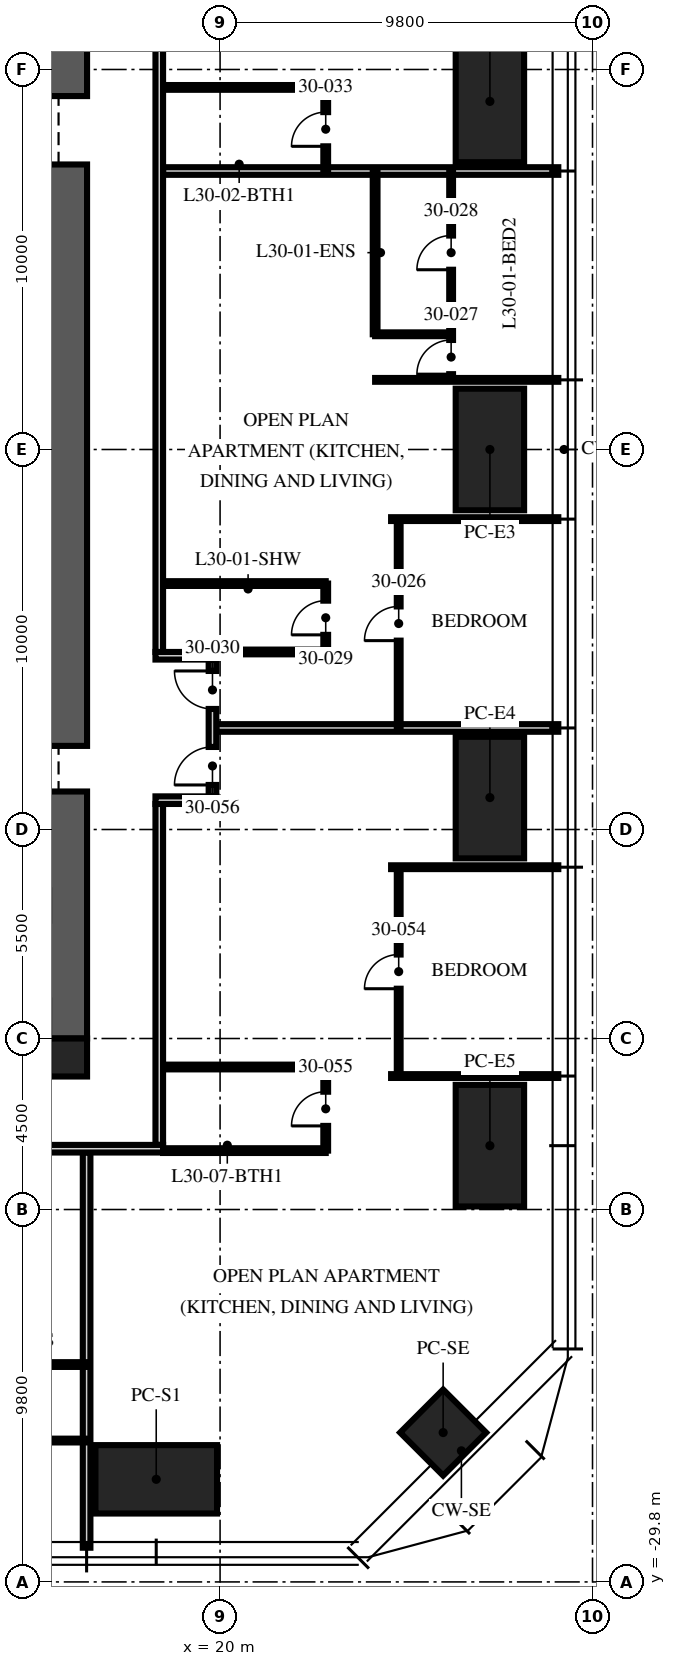
"""IFC4 building model, lengths in metres.
Left out: names, types, materials, properties, quantities, classifications, styles, units other than length and angle.
Written with IfcOpenShell. Run it as: python <this file> out.ifc"""

import sys

from ifc_helpers import new_model, si_unit, direction, frame, frame_2d, origin, origin_2d, place, context, subcontext, project, spatial, rectangle, extrude, element, fill, save


model = new_model("IFC4")
c1 = context("Model", 3, precision=1e-05, world=origin(), true_north=direction((0.0, 1.0)))
c2 = subcontext(c1, "Body", "Model", "MODEL_VIEW")
j1 = project(units=[si_unit("LENGTHUNIT", "METRE"), si_unit("PLANEANGLEUNIT", "RADIAN")], contexts=[c1])
p1 = place(None, origin())
s1 = spatial("IfcSite", under=j1, at=p1, CompositionType="ELEMENT")
p2 = place(p1, origin())
s2 = spatial("IfcBuilding", under=s1, at=p2, CompositionType="ELEMENT")
p3 = place(p2, frame((0.0, 0.0, 122.25)))
s3 = spatial("IfcBuildingStorey", under=s2, at=p3, CompositionType="ELEMENT", Elevation=122.25)
p4 = place(p3, frame((15.5, -15.5, -0.25), z_axis=(0.0, 0.0, 1.0), x_axis=(0.0, 1.0, 0.0)))
e1 = element("IfcWall", 1, at=p4, inside=s3, PredefinedType="SHEAR", context=c2, shape_type="SweptSolid", body=[
    extrude(rectangle(XDim=31.0, YDim=2.0, at=frame_2d((15.5, 0.0))), origin(), (0.0, 0.0, 1.0), 3.75),
])
p5 = place(p4, frame((6.5, 0.0, 0.25)))
e2 = element("IfcOpeningElement", 2, at=p5, cuts=e1, PredefinedType="OPENING", context=c2, shape_type="SweptSolid", body=[
    extrude(rectangle(XDim=1.2, YDim=2.1, at=frame_2d((0.6, 1.05))), frame((0.0, 1.01, 0.0), z_axis=(0.0, -1.0, 0.0), x_axis=(1.0, 0.0, 0.0)), (0.0, 0.0, 1.0), 2.02),
])
p6 = place(p4, frame((23.0, 0.0, 0.25)))
e3 = element("IfcOpeningElement", 3, at=p6, cuts=e1, PredefinedType="OPENING", context=c2, shape_type="SweptSolid", body=[
    extrude(rectangle(XDim=1.8, YDim=2.1, at=frame_2d((0.9, 1.05))), frame((0.0, 1.01, 0.0), z_axis=(0.0, -1.0, 0.0), x_axis=(1.0, 0.0, 0.0)), (0.0, 0.0, 1.0), 2.02),
])
p7 = place(p3, frame((16.0, -16.0, -0.25), z_axis=(0.0, 0.0, 1.0), x_axis=(1.0, 0.0, 0.0)))
e4 = element("IfcColumn", 4, at=p7, inside=s3, PredefinedType="COLUMN", context=c2, shape_type="SweptSolid", body=[
    extrude(rectangle(XDim=1.0, YDim=1.0, at=origin_2d()), origin(), (0.0, 0.0, 1.0), 3.75),
])
for number, where, z_axis, x_axis in (
    (5, (27.1, 9.16, 0.0), (0.0, 0.0, 1.0), (0.0, 1.0, 0.0)),
    (6, (27.1, 0.0, 0.0), (0.0, 0.0, 1.0), (0.0, 1.0, 0.0)),
    (7, (27.1, -9.16, 0.0), (0.0, 0.0, 1.0), (0.0, 1.0, 0.0)),
    (8, (27.1, -18.32, 0.0), (0.0, 0.0, 1.0), (0.0, 1.0, 0.0)),
    (9, (18.32, -27.1, 0.0), (0.0, 0.0, 1.0), (1.0, 0.0, 0.0)),
):
    element("IfcColumn", number, at=place(p3, frame(where, z_axis=z_axis, x_axis=x_axis)), inside=s3, PredefinedType="COLUMN", context=c2, shape_type="SweptSolid", body=[
        extrude(rectangle(XDim=3.2, YDim=1.8, at=origin_2d()), origin(), (0.0, 0.0, 1.0), 3.75),
    ])
p8 = place(p3, frame((25.87, -25.87, 0.0), z_axis=(0.0, 0.0, 1.0), x_axis=(0.707106781187, 0.707106781187, 0.0)))
e10 = element("IfcColumn", 10, at=p8, inside=s3, PredefinedType="COLUMN", context=c2, shape_type="SweptSolid", body=[
    extrude(rectangle(XDim=1.6, YDim=1.6, at=origin_2d()), origin(), (0.0, 0.0, 1.0), 3.75),
])
p9 = place(p3, frame((19.9, -7.328, 0.0), z_axis=(0.0, 0.0, 1.0), x_axis=(1.0, 0.0, 0.0)))
e11 = element("IfcWall", 11, at=p9, inside=s3, PredefinedType="PARTITIONING", context=c2, shape_type="SweptSolid", body=[
    extrude(rectangle(XDim=9.0, YDim=0.2, at=frame_2d((4.5, 0.0))), origin(), (0.0, 0.0, 1.0), 2.81),
])
p10 = place(p3, frame((24.5, -1.832, 0.0), z_axis=(0.0, 0.0, 1.0), x_axis=(1.0, 0.0, 0.0)))
e12 = element("IfcWall", 12, at=p10, inside=s3, PredefinedType="PARTITIONING", context=c2, shape_type="SweptSolid", body=[
    extrude(rectangle(XDim=4.4, YDim=0.1, at=frame_2d((2.2, 0.0))), origin(), (0.0, 0.0, 1.0), 2.81),
])
p11 = place(p3, frame((24.08, 1.832, 0.0), z_axis=(0.0, 0.0, 1.0), x_axis=(1.0, 0.0, 0.0)))
e13 = element("IfcWall", 13, at=p11, inside=s3, PredefinedType="PARTITIONING", context=c2, shape_type="SweptSolid", body=[
    extrude(rectangle(XDim=4.82, YDim=0.1, at=frame_2d((2.41, 0.0))), origin(), (0.0, 0.0, 1.0), 2.81),
])
for number, where, z_axis, x_axis in (
    (14, (18.5, 7.328, 0.0), (0.0, 0.0, 1.0), (1.0, 0.0, 0.0)),
    (15, (16.488, -18.5, 0.0), (0.0, 0.0, 1.0), (0.0, -1.0, 0.0)),
):
    element("IfcWall", number, at=place(p3, frame(where, z_axis=z_axis, x_axis=x_axis)), inside=s3, PredefinedType="PARTITIONING", context=c2, shape_type="SweptSolid", body=[
        extrude(rectangle(XDim=10.4, YDim=0.2, at=frame_2d((5.2, 0.0))), origin(), (0.0, 0.0, 1.0), 2.81),
    ])
for number, where, z_axis, x_axis in (
    (16, (24.5, -16.488, 0.0), (0.0, 0.0, 1.0), (1.0, 0.0, 0.0)),
    (17, (24.5, -10.992, 0.0), (0.0, 0.0, 1.0), (1.0, 0.0, 0.0)),
):
    element("IfcWall", number, at=place(p3, frame(where, z_axis=z_axis, x_axis=x_axis)), inside=s3, PredefinedType="PARTITIONING", context=c2, shape_type="SweptSolid", body=[
        extrude(rectangle(XDim=4.4, YDim=0.1, at=frame_2d((2.2, 0.0))), origin(), (0.0, 0.0, 1.0), 2.81),
    ])
p12 = place(p3, frame((24.7, -7.328, 0.0), z_axis=(0.0, 0.0, 1.0), x_axis=(0.0, 1.0, 0.0)))
e18 = element("IfcWall", 18, at=p12, inside=s3, PredefinedType="PARTITIONING", context=c2, shape_type="SweptSolid", body=[
    extrude(rectangle(XDim=5.496, YDim=0.1, at=frame_2d((2.748, 0.0))), origin(), (0.0, 0.0, 1.0), 2.81),
])
p13 = place(p12, frame((2.298, 0.0, 0.0)))
e19 = element("IfcOpeningElement", 19, at=p13, cuts=e18, PredefinedType="OPENING", context=c2, shape_type="SweptSolid", body=[
    extrude(rectangle(XDim=0.9, YDim=2.1, at=frame_2d((0.45, 1.05))), frame((0.0, 0.06, 0.0), z_axis=(0.0, -1.0, 0.0), x_axis=(1.0, 0.0, 0.0)), (0.0, 0.0, 1.0), 0.12),
])
p14 = place(p3, frame((26.08, 1.832, 0.0), z_axis=(0.0, 0.0, 1.0), x_axis=(0.0, 1.0, 0.0)))
e20 = element("IfcWall", 20, at=p14, inside=s3, PredefinedType="PARTITIONING", context=c2, shape_type="SweptSolid", body=[
    extrude(rectangle(XDim=5.496, YDim=0.1, at=frame_2d((2.748, 0.0))), origin(), (0.0, 0.0, 1.0), 2.81),
])
p15 = place(p14, frame((0.15, 0.0, 0.0)))
e21 = element("IfcOpeningElement", 21, at=p15, cuts=e20, PredefinedType="OPENING", context=c2, shape_type="SweptSolid", body=[
    extrude(rectangle(XDim=0.9, YDim=2.1, at=frame_2d((0.45, 1.05))), frame((0.0, 0.06, 0.0), z_axis=(0.0, -1.0, 0.0), x_axis=(1.0, 0.0, 0.0)), (0.0, 0.0, 1.0), 0.12),
])
p16 = place(p14, frame((2.898, 0.0, 0.0)))
e22 = element("IfcOpeningElement", 22, at=p16, cuts=e20, PredefinedType="OPENING", context=c2, shape_type="SweptSolid", body=[
    extrude(rectangle(XDim=0.9, YDim=2.1, at=frame_2d((0.45, 1.05))), frame((0.0, 0.06, 0.0), z_axis=(0.0, -1.0, 0.0), x_axis=(1.0, 0.0, 0.0)), (0.0, 0.0, 1.0), 0.12),
])
p17 = place(p3, frame((24.08, 3.032, 0.0), z_axis=(0.0, 0.0, 1.0), x_axis=(1.0, 0.0, 0.0)))
e23 = element("IfcWall", 23, at=p17, inside=s3, PredefinedType="PARTITIONING", context=c2, shape_type="SweptSolid", body=[
    extrude(rectangle(XDim=2.0, YDim=0.1, at=frame_2d((1.0, 0.0))), origin(), (0.0, 0.0, 1.0), 3.5),
])
p18 = place(p3, frame((24.08, 3.032, 0.0), z_axis=(0.0, 0.0, 1.0), x_axis=(0.0, 1.0, 0.0)))
e24 = element("IfcWall", 24, at=p18, inside=s3, PredefinedType="PARTITIONING", context=c2, shape_type="SweptSolid", body=[
    extrude(rectangle(XDim=4.296, YDim=0.125, at=frame_2d((2.148, 0.0))), origin(), (0.0, 0.0, 1.0), 2.81),
])
p19 = place(p3, frame((22.78, -5.328, 0.0), z_axis=(0.0, 0.0, 1.0), x_axis=(0.0, 1.0, 0.0)))
e25 = element("IfcWall", 25, at=p19, inside=s3, PredefinedType="PARTITIONING", context=c2, shape_type="SweptSolid", body=[
    extrude(rectangle(XDim=1.8, YDim=0.125, at=frame_2d((0.9, 0.0))), origin(), (0.0, 0.0, 1.0), 2.81),
])
p20 = place(p19, frame((0.45, 0.0, 0.0)))
e26 = element("IfcOpeningElement", 26, at=p20, cuts=e25, PredefinedType="OPENING", context=c2, shape_type="SweptSolid", body=[
    extrude(rectangle(XDim=0.9, YDim=2.1, at=frame_2d((0.45, 1.05))), frame((0.0, 0.073, 0.0), z_axis=(0.0, -1.0, 0.0), x_axis=(1.0, 0.0, 0.0)), (0.0, 0.0, 1.0), 0.145),
])
p21 = place(p3, frame((19.97, -5.328, 0.0), z_axis=(0.0, 0.0, 1.0), x_axis=(1.0, 0.0, 0.0)))
e27 = element("IfcWall", 27, at=p21, inside=s3, PredefinedType="PARTITIONING", context=c2, shape_type="SweptSolid", body=[
    extrude(rectangle(XDim=2.81, YDim=0.125, at=frame_2d((1.405, 0.0))), origin(), (0.0, 0.0, 1.0), 3.5),
])
p22 = place(p3, frame((18.5, -3.528, 0.0), z_axis=(0.0, 0.0, 1.0), x_axis=(1.0, 0.0, 0.0)))
e28 = element("IfcWall", 28, at=p22, inside=s3, PredefinedType="PARTITIONING", context=c2, shape_type="SweptSolid", body=[
    extrude(rectangle(XDim=4.28, YDim=0.125, at=frame_2d((2.14, 0.0))), origin(), (0.0, 0.0, 1.0), 3.5),
])
p23 = place(p3, frame((22.78, 7.328, 0.0), z_axis=(0.0, 0.0, 1.0), x_axis=(0.0, 1.0, 0.0)))
e29 = element("IfcWall", 29, at=p23, inside=s3, PredefinedType="PARTITIONING", context=c2, shape_type="SweptSolid", body=[
    extrude(rectangle(XDim=2.2, YDim=0.125, at=frame_2d((1.1, 0.0))), origin(), (0.0, 0.0, 1.0), 2.7),
])
p24 = place(p23, frame((0.65, 0.0, 0.0)))
e30 = element("IfcOpeningElement", 30, at=p24, cuts=e29, PredefinedType="OPENING", context=c2, shape_type="SweptSolid", body=[
    extrude(rectangle(XDim=0.9, YDim=2.1, at=frame_2d((0.45, 1.05))), frame((0.0, 0.073, 0.0), z_axis=(0.0, -1.0, 0.0), x_axis=(1.0, 0.0, 0.0)), (0.0, 0.0, 1.0), 0.145),
])
p25 = place(p3, frame((18.5, 9.528, 0.0), z_axis=(0.0, 0.0, 1.0), x_axis=(1.0, 0.0, 0.0)))
e31 = element("IfcWall", 31, at=p25, inside=s3, PredefinedType="PARTITIONING", context=c2, shape_type="SweptSolid", body=[
    extrude(rectangle(XDim=4.28, YDim=0.125, at=frame_2d((2.14, 0.0))), origin(), (0.0, 0.0, 1.0), 3.5),
])
p26 = place(p3, frame((10.992, -26.08, 0.0), z_axis=(0.0, 0.0, 1.0), x_axis=(1.0, 0.0, 0.0)))
e32 = element("IfcWall", 32, at=p26, inside=s3, PredefinedType="PARTITIONING", context=c2, shape_type="SweptSolid", body=[
    extrude(rectangle(XDim=5.496, YDim=0.1, at=frame_2d((2.748, 0.0))), origin(), (0.0, 0.0, 1.0), 2.81),
])
p27 = place(p26, frame((0.15, 0.0, 0.0)))
e33 = element("IfcOpeningElement", 33, at=p27, cuts=e32, PredefinedType="OPENING", context=c2, shape_type="SweptSolid", body=[
    extrude(rectangle(XDim=0.9, YDim=2.1, at=frame_2d((0.45, 1.05))), frame((0.0, 0.06, 0.0), z_axis=(0.0, -1.0, 0.0), x_axis=(1.0, 0.0, 0.0)), (0.0, 0.0, 1.0), 0.12),
])
p28 = place(p26, frame((2.898, 0.0, 0.0)))
e34 = element("IfcOpeningElement", 34, at=p28, cuts=e32, PredefinedType="OPENING", context=c2, shape_type="SweptSolid", body=[
    extrude(rectangle(XDim=0.9, YDim=2.1, at=frame_2d((0.45, 1.05))), frame((0.0, 0.06, 0.0), z_axis=(0.0, -1.0, 0.0), x_axis=(1.0, 0.0, 0.0)), (0.0, 0.0, 1.0), 0.12),
])
p29 = place(p3, frame((12.192, -24.08, 0.0), z_axis=(0.0, 0.0, 1.0), x_axis=(1.0, 0.0, 0.0)))
e35 = element("IfcWall", 35, at=p29, inside=s3, PredefinedType="PARTITIONING", context=c2, shape_type="SweptSolid", body=[
    extrude(rectangle(XDim=4.296, YDim=0.125, at=frame_2d((2.148, 0.0))), origin(), (0.0, 0.0, 1.0), 2.81),
])
p30 = place(p3, frame((24.7, -16.488, 0.0), z_axis=(0.0, 0.0, 1.0), x_axis=(0.0, 1.0, 0.0)))
e36 = element("IfcWall", 36, at=p30, inside=s3, PredefinedType="PARTITIONING", context=c2, shape_type="SweptSolid", body=[
    extrude(rectangle(XDim=5.496, YDim=0.1, at=frame_2d((2.748, 0.0))), origin(), (0.0, 0.0, 1.0), 2.81),
])
p31 = place(p30, frame((2.298, 0.0, 0.0)))
e37 = element("IfcOpeningElement", 37, at=p31, cuts=e36, PredefinedType="OPENING", context=c2, shape_type="SweptSolid", body=[
    extrude(rectangle(XDim=0.9, YDim=2.1, at=frame_2d((0.45, 1.05))), frame((0.0, 0.06, 0.0), z_axis=(0.0, -1.0, 0.0), x_axis=(1.0, 0.0, 0.0)), (0.0, 0.0, 1.0), 0.12),
])
p32 = place(p3, frame((22.78, -18.45, 0.0), z_axis=(0.0, 0.0, 1.0), x_axis=(0.0, 1.0, 0.0)))
e38 = element("IfcWall", 38, at=p32, inside=s3, PredefinedType="PARTITIONING", context=c2, shape_type="SweptSolid", body=[
    extrude(rectangle(XDim=2.2, YDim=0.125, at=frame_2d((1.1, 0.0))), origin(), (0.0, 0.0, 1.0), 2.7),
])
p33 = place(p32, frame((0.65, 0.0, 0.0)))
e39 = element("IfcOpeningElement", 39, at=p33, cuts=e38, PredefinedType="OPENING", context=c2, shape_type="SweptSolid", body=[
    extrude(rectangle(XDim=0.9, YDim=2.1, at=frame_2d((0.45, 1.05))), frame((0.0, 0.073, 0.0), z_axis=(0.0, -1.0, 0.0), x_axis=(1.0, 0.0, 0.0)), (0.0, 0.0, 1.0), 0.145),
])
p34 = place(p3, frame((18.5, -18.45, 0.0), z_axis=(0.0, 0.0, 1.0), x_axis=(1.0, 0.0, 0.0)))
e40 = element("IfcWall", 40, at=p34, inside=s3, PredefinedType="PARTITIONING", context=c2, shape_type="SweptSolid", body=[
    extrude(rectangle(XDim=4.28, YDim=0.125, at=frame_2d((2.14, 0.0))), origin(), (0.0, 0.0, 1.0), 2.3),
])
p35 = place(p3, frame((18.5, -16.25, 0.0), z_axis=(0.0, 0.0, 1.0), x_axis=(1.0, 0.0, 0.0)))
e41 = element("IfcWall", 41, at=p35, inside=s3, PredefinedType="PARTITIONING", context=c2, shape_type="SweptSolid", body=[
    extrude(rectangle(XDim=4.28, YDim=0.125, at=frame_2d((2.14, 0.0))), origin(), (0.0, 0.0, 1.0), 3.5),
])
p36 = place(p3, frame((18.4, -18.3, 0.0), z_axis=(0.0, 0.0, 1.0), x_axis=(0.0, 1.0, 0.0)))
e42 = element("IfcWall", 42, at=p36, inside=s3, PredefinedType="PARTITIONING", context=c2, shape_type="SweptSolid", body=[
    extrude(rectangle(XDim=8.972, YDim=0.2, at=frame_2d((4.486, 0.0))), origin(), (0.0, 0.0, 1.0), 2.3),
])
p37 = place(p3, frame((18.3, -9.228, 0.0), z_axis=(0.0, 0.0, 1.0), x_axis=(1.0, 0.0, 0.0)))
e43 = element("IfcWall", 43, at=p37, inside=s3, PredefinedType="PARTITIONING", context=c2, shape_type="SweptSolid", body=[
    extrude(rectangle(XDim=1.6, YDim=0.2, at=frame_2d((0.8, 0.0))), origin(), (0.0, 0.0, 1.0), 2.7),
])
p38 = place(p3, frame((18.3, -5.428, 0.0), z_axis=(0.0, 0.0, 1.0), x_axis=(1.0, 0.0, 0.0)))
e44 = element("IfcWall", 44, at=p38, inside=s3, PredefinedType="PARTITIONING", context=c2, shape_type="SweptSolid", body=[
    extrude(rectangle(XDim=1.6, YDim=0.2, at=frame_2d((0.8, 0.0))), origin(), (0.0, 0.0, 1.0), 3.5),
])
p39 = place(p3, frame((19.8, -9.128, 0.0), z_axis=(0.0, 0.0, 1.0), x_axis=(0.0, 1.0, 0.0)))
e45 = element("IfcWall", 45, at=p39, inside=s3, PredefinedType="PARTITIONING", context=c2, shape_type="SweptSolid", body=[
    extrude(rectangle(XDim=3.6, YDim=0.2, at=frame_2d((1.8, 0.0))), origin(), (0.0, 0.0, 1.0), 2.7),
])
p40 = place(p39, frame((2.3, 0.0, 0.0)))
e46 = element("IfcOpeningElement", 46, at=p40, cuts=e45, PredefinedType="OPENING", context=c2, shape_type="SweptSolid", body=[
    extrude(rectangle(XDim=1.0, YDim=2.2, at=frame_2d((0.5, 1.1))), frame((0.0, 0.11, 0.0), z_axis=(0.0, -1.0, 0.0), x_axis=(1.0, 0.0, 0.0)), (0.0, 0.0, 1.0), 0.22),
])
p41 = place(p39, frame((0.3, 0.0, 0.0)))
e47 = element("IfcOpeningElement", 47, at=p41, cuts=e45, PredefinedType="OPENING", context=c2, shape_type="SweptSolid", body=[
    extrude(rectangle(XDim=1.0, YDim=2.2, at=frame_2d((0.5, 1.1))), frame((0.0, 0.11, 0.0), z_axis=(0.0, -1.0, 0.0), x_axis=(1.0, 0.0, 0.0)), (0.0, 0.0, 1.0), 0.22),
])
p42 = place(p3, frame((18.4, -5.328, 0.0), z_axis=(0.0, 0.0, 1.0), x_axis=(0.0, 1.0, 0.0)))
e48 = element("IfcWall", 48, at=p42, inside=s3, PredefinedType="PARTITIONING", context=c2, shape_type="SweptSolid", body=[
    extrude(rectangle(XDim=22.028, YDim=0.2, at=frame_2d((11.014, 0.0))), origin(), (0.0, 0.0, 1.0), 2.7),
])
p43 = place(p42, frame((19.926, 0.0, 0.0)))
e49 = element("IfcOpeningElement", 49, at=p43, cuts=e48, PredefinedType="OPENING", context=c2, shape_type="SweptSolid", body=[
    extrude(rectangle(XDim=1.0, YDim=2.2, at=frame_2d((0.5, 1.1))), frame((0.0, 0.11, 0.0), z_axis=(0.0, -1.0, 0.0), x_axis=(1.0, 0.0, 0.0)), (0.0, 0.0, 1.0), 0.22),
])
p44 = place(p3, frame((18.5, -18.4, 0.0), z_axis=(0.0, 0.0, 1.0), x_axis=(-1.0, 0.0, 0.0)))
e50 = element("IfcWall", 50, at=p44, inside=s3, PredefinedType="PARTITIONING", context=c2, shape_type="SweptSolid", body=[
    extrude(rectangle(XDim=12.9, YDim=0.2, at=frame_2d((6.45, 0.0))), origin(), (0.0, 0.0, 1.0), 2.3),
])
p45 = place(p13, origin())
e51 = element("IfcDoor", 51, at=p45, inside=s3, OperationType="SINGLE_SWING_LEFT", PredefinedType="DOOR", context=c2, shape_type="SweptSolid", body=[
    extrude(rectangle(XDim=0.9, YDim=2.1, at=frame_2d((0.45, 1.05))), frame((0.0, 0.025, 0.0), z_axis=(0.0, -1.0, 0.0), x_axis=(1.0, 0.0, 0.0)), (0.0, 0.0, 1.0), 0.05),
])
fill(e19, e51)
p46 = place(p15, origin())
e52 = element("IfcDoor", 52, at=p46, inside=s3, OperationType="SINGLE_SWING_LEFT", PredefinedType="DOOR", context=c2, shape_type="SweptSolid", body=[
    extrude(rectangle(XDim=0.9, YDim=2.1, at=frame_2d((0.45, 1.05))), frame((0.0, 0.025, 0.0), z_axis=(0.0, -1.0, 0.0), x_axis=(1.0, 0.0, 0.0)), (0.0, 0.0, 1.0), 0.05),
])
fill(e21, e52)
p47 = place(p16, origin())
e53 = element("IfcDoor", 53, at=p47, inside=s3, OperationType="SINGLE_SWING_LEFT", PredefinedType="DOOR", context=c2, shape_type="SweptSolid", body=[
    extrude(rectangle(XDim=0.9, YDim=2.1, at=frame_2d((0.45, 1.05))), frame((0.0, 0.025, 0.0), z_axis=(0.0, -1.0, 0.0), x_axis=(1.0, 0.0, 0.0)), (0.0, 0.0, 1.0), 0.05),
])
fill(e22, e53)
p48 = place(p20, origin())
e54 = element("IfcDoor", 54, at=p48, inside=s3, OperationType="SINGLE_SWING_LEFT", PredefinedType="DOOR", context=c2, shape_type="SweptSolid", body=[
    extrude(rectangle(XDim=0.9, YDim=2.1, at=frame_2d((0.45, 1.05))), frame((0.0, 0.025, 0.0), z_axis=(0.0, -1.0, 0.0), x_axis=(1.0, 0.0, 0.0)), (0.0, 0.0, 1.0), 0.05),
])
fill(e26, e54)
p49 = place(p40, origin())
e55 = element("IfcDoor", 55, at=p49, inside=s3, OperationType="SINGLE_SWING_RIGHT", PredefinedType="DOOR", context=c2, shape_type="SweptSolid", body=[
    extrude(rectangle(XDim=1.0, YDim=2.2, at=frame_2d((0.5, 1.1))), frame((0.0, 0.025, 0.0), z_axis=(0.0, -1.0, 0.0), x_axis=(1.0, 0.0, 0.0)), (0.0, 0.0, 1.0), 0.05),
])
fill(e46, e55)
p50 = place(p24, origin())
e56 = element("IfcDoor", 56, at=p50, inside=s3, OperationType="SINGLE_SWING_LEFT", PredefinedType="DOOR", context=c2, shape_type="SweptSolid", body=[
    extrude(rectangle(XDim=0.9, YDim=2.1, at=frame_2d((0.45, 1.05))), frame((0.0, 0.025, 0.0), z_axis=(0.0, -1.0, 0.0), x_axis=(1.0, 0.0, 0.0)), (0.0, 0.0, 1.0), 0.05),
])
fill(e30, e56)
p51 = place(p31, origin())
e57 = element("IfcDoor", 57, at=p51, inside=s3, OperationType="SINGLE_SWING_LEFT", PredefinedType="DOOR", context=c2, shape_type="SweptSolid", body=[
    extrude(rectangle(XDim=0.9, YDim=2.1, at=frame_2d((0.45, 1.05))), frame((0.0, 0.025, 0.0), z_axis=(0.0, -1.0, 0.0), x_axis=(1.0, 0.0, 0.0)), (0.0, 0.0, 1.0), 0.05),
])
fill(e37, e57)
p52 = place(p33, origin())
e58 = element("IfcDoor", 58, at=p52, inside=s3, OperationType="SINGLE_SWING_LEFT", PredefinedType="DOOR", context=c2, shape_type="SweptSolid", body=[
    extrude(rectangle(XDim=0.9, YDim=2.1, at=frame_2d((0.45, 1.05))), frame((0.0, 0.025, 0.0), z_axis=(0.0, -1.0, 0.0), x_axis=(1.0, 0.0, 0.0)), (0.0, 0.0, 1.0), 0.05),
])
fill(e39, e58)
p53 = place(p41, origin())
e59 = element("IfcDoor", 59, at=p53, inside=s3, OperationType="SINGLE_SWING_LEFT", PredefinedType="DOOR", context=c2, shape_type="SweptSolid", body=[
    extrude(rectangle(XDim=1.0, YDim=2.2, at=frame_2d((0.5, 1.1))), frame((0.0, 0.025, 0.0), z_axis=(0.0, -1.0, 0.0), x_axis=(1.0, 0.0, 0.0)), (0.0, 0.0, 1.0), 0.05),
])
fill(e47, e59)
save(model, sys.argv[1])
